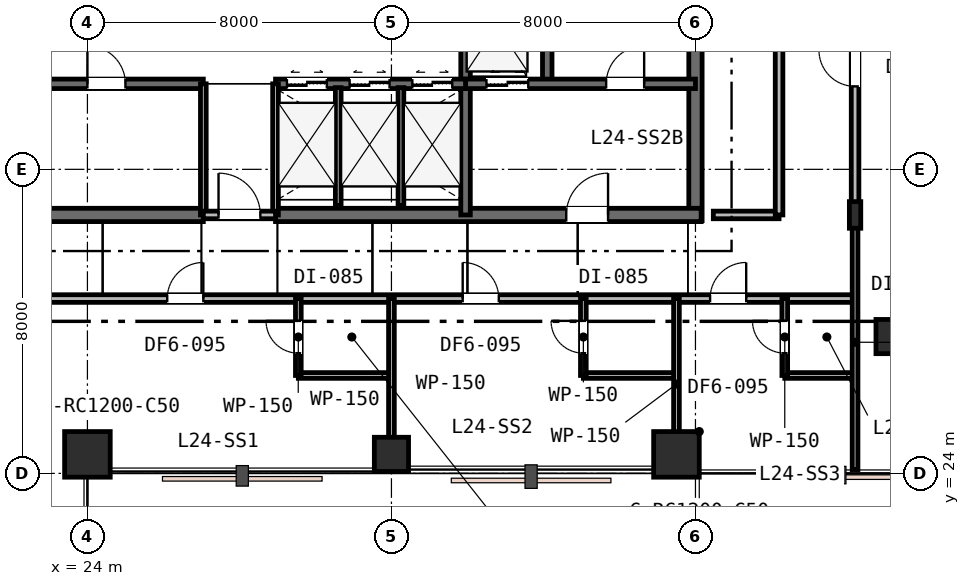
"""IFC4 building model, lengths in metres.
Left out: names, types, materials, properties, quantities, classifications, styles, units other than length and angle.
Written with IfcOpenShell. Run it as: python <this file> out.ifc"""

import sys

from ifc_helpers import new_model, si_unit, direction, frame, frame_2d, origin, origin_2d, place, context, subcontext, project, spatial, rectangle, i_section, extrude, element, fill, save


model = new_model("IFC4")
c1 = context("Model", 3, precision=1e-05, world=origin(), true_north=direction((0.0, 1.0)))
c2 = subcontext(c1, "Body", "Model", "MODEL_VIEW")
j1 = project(units=[si_unit("LENGTHUNIT", "METRE"), si_unit("PLANEANGLEUNIT", "RADIAN")], contexts=[c1])
p1 = place(None, origin())
s1 = spatial("IfcSite", under=j1, at=p1, CompositionType="ELEMENT")
p2 = place(p1, origin())
s2 = spatial("IfcBuilding", under=s1, at=p2, CompositionType="ELEMENT")
p3 = place(p2, frame((0.0, 0.0, 97.2)))
s3 = spatial("IfcBuildingStorey", under=s2, at=p3, CompositionType="ELEMENT", Elevation=97.2)
p4 = place(p3, frame((40.0, 30.65, 0.0), z_axis=(0.0, 0.0, 1.0), x_axis=(0.0, 1.0, 0.0)))
e1 = element("IfcWall", 1, at=p4, inside=s3, PredefinedType="SHEAR", context=c2, shape_type="SweptSolid", body=[
    extrude(rectangle(XDim=12.3, YDim=0.35, at=frame_2d((6.15, 0.0))), origin(), (0.0, 0.0, 1.0), 3.6),
])
p5 = place(p3, frame((15.85, 30.8, 0.0), z_axis=(0.0, 0.0, 1.0), x_axis=(1.0, 0.0, 0.0)))
e2 = element("IfcWall", 2, at=p5, inside=s3, PredefinedType="SHEAR", context=c2, shape_type="SweptSolid", body=[
    extrude(rectangle(XDim=11.2, YDim=0.35, at=frame_2d((5.6, 0.0))), origin(), (0.0, 0.0, 1.0), 3.6),
])
p6 = place(p5, frame((2.45, 0.0, 0.0)))
e3 = element("IfcOpeningElement", 3, at=p6, cuts=e2, PredefinedType="OPENING", context=c2, shape_type="SweptSolid", body=[
    extrude(rectangle(XDim=1.1, YDim=2.15, at=frame_2d((0.55, 1.075))), frame((0.0, 0.185, 0.0), z_axis=(0.0, -1.0, 0.0), x_axis=(1.0, 0.0, 0.0)), (0.0, 0.0, 1.0), 0.37),
])
p7 = place(p3, frame((28.95, 30.8, 0.0), z_axis=(0.0, 0.0, 1.0), x_axis=(1.0, 0.0, 0.0)))
e4 = element("IfcWall", 4, at=p7, inside=s3, PredefinedType="SHEAR", context=c2, shape_type="SweptSolid", body=[
    extrude(rectangle(XDim=11.2, YDim=0.35, at=frame_2d((5.6, 0.0))), origin(), (0.0, 0.0, 1.0), 3.6),
])
p8 = place(p7, frame((7.65, 0.0, 0.0)))
e5 = element("IfcOpeningElement", 5, at=p8, cuts=e4, PredefinedType="OPENING", context=c2, shape_type="SweptSolid", body=[
    extrude(rectangle(XDim=1.1, YDim=2.15, at=frame_2d((0.55, 1.075))), frame((0.0, 0.185, 0.0), z_axis=(0.0, -1.0, 0.0), x_axis=(1.0, 0.0, 0.0)), (0.0, 0.0, 1.0), 0.37),
])
p9 = place(p3, frame((36.1, 34.25, 0.0), z_axis=(0.0, 0.0, 1.0), x_axis=(0.0, 1.0, 0.0)))
e6 = element("IfcWall", 6, at=p9, inside=s3, PredefinedType="SHEAR", context=c2, shape_type="SweptSolid", body=[
    extrude(rectangle(XDim=8.65, YDim=0.25, at=frame_2d((4.325, 0.0))), origin(), (0.0, 0.0, 1.0), 3.6),
])
p10 = place(p3, frame((33.95, 30.8, 0.0), z_axis=(0.0, 0.0, 1.0), x_axis=(0.0, 1.0, 0.0)))
e7 = element("IfcWall", 7, at=p10, inside=s3, PredefinedType="SHEAR", context=c2, shape_type="SweptSolid", body=[
    extrude(rectangle(XDim=6.45, YDim=0.25, at=frame_2d((3.225, 0.0))), origin(), (0.0, 0.0, 1.0), 3.6),
])
p11 = place(p3, frame((33.95, 34.25, 0.0), z_axis=(0.0, 0.0, 1.0), x_axis=(1.0, 0.0, 0.0)))
e8 = element("IfcWall", 8, at=p11, inside=s3, PredefinedType="SHEAR", context=c2, shape_type="SweptSolid", body=[
    extrude(rectangle(XDim=6.05, YDim=0.25, at=frame_2d((3.025, 0.0))), origin(), (0.0, 0.0, 1.0), 3.6),
])
p12 = place(p11, frame((3.7, 0.0, 0.0)))
e9 = element("IfcOpeningElement", 9, at=p12, cuts=e8, PredefinedType="OPENING", context=c2, shape_type="SweptSolid", body=[
    extrude(rectangle(XDim=1.0, YDim=2.15, at=frame_2d((0.5, 1.075))), frame((0.0, 0.135, 0.0), z_axis=(0.0, -1.0, 0.0), x_axis=(1.0, 0.0, 0.0)), (0.0, 0.0, 1.0), 0.27),
])
p13 = place(p11, frame((0.55, 0.0, 0.0)))
e10 = element("IfcOpeningElement", 10, at=p13, cuts=e8, PredefinedType="OPENING", context=c2, shape_type="SweptSolid", body=[
    extrude(rectangle(XDim=1.1, YDim=2.15, at=frame_2d((0.55, 1.075))), frame((0.0, 0.135, 0.0), z_axis=(0.0, -1.0, 0.0), x_axis=(1.0, 0.0, 0.0)), (0.0, 0.0, 1.0), 0.27),
])
p14 = place(p3, frame((22.05, 34.25, 0.0), z_axis=(0.0, 0.0, 1.0), x_axis=(1.0, 0.0, 0.0)))
e11 = element("IfcWall", 11, at=p14, inside=s3, PredefinedType="SHEAR", context=c2, shape_type="SweptSolid", body=[
    extrude(rectangle(XDim=5.0, YDim=0.25, at=frame_2d((2.5, 0.0))), origin(), (0.0, 0.0, 1.0), 3.6),
])
p15 = place(p14, frame((1.95, 0.0, 0.0)))
e12 = element("IfcOpeningElement", 12, at=p15, cuts=e11, PredefinedType="OPENING", context=c2, shape_type="SweptSolid", body=[
    extrude(rectangle(XDim=1.0, YDim=2.15, at=frame_2d((0.5, 1.075))), frame((0.0, 0.135, 0.0), z_axis=(0.0, -1.0, 0.0), x_axis=(1.0, 0.0, 0.0)), (0.0, 0.0, 1.0), 0.27),
])
p16 = place(p3, frame((28.95, 34.25, 0.0), z_axis=(0.0, 0.0, 1.0), x_axis=(1.0, 0.0, 0.0)))
e13 = element("IfcWall", 13, at=p16, inside=s3, PredefinedType="SHEAR", context=c2, shape_type="SweptSolid", body=[
    extrude(rectangle(XDim=5.0, YDim=0.25, at=frame_2d((2.5, 0.0))), origin(), (0.0, 0.0, 1.0), 3.6),
])
p17 = place(p16, frame((0.3, 0.0, 0.0)))
e14 = element("IfcOpeningElement", 14, at=p17, cuts=e13, PredefinedType="OPENING", context=c2, shape_type="SweptSolid", body=[
    extrude(rectangle(XDim=1.05, YDim=2.15, at=frame_2d((0.525, 1.075))), frame((0.0, 0.135, 0.0), z_axis=(0.0, -1.0, 0.0), x_axis=(1.0, 0.0, 0.0)), (0.0, 0.0, 1.0), 0.27),
])
p18 = place(p16, frame((1.95, 0.0, 0.0)))
e15 = element("IfcOpeningElement", 15, at=p18, cuts=e13, PredefinedType="OPENING", context=c2, shape_type="SweptSolid", body=[
    extrude(rectangle(XDim=1.05, YDim=2.15, at=frame_2d((0.525, 1.075))), frame((0.0, 0.135, 0.0), z_axis=(0.0, -1.0, 0.0), x_axis=(1.0, 0.0, 0.0)), (0.0, 0.0, 1.0), 0.27),
])
p19 = place(p16, frame((3.6, 0.0, 0.0)))
e16 = element("IfcOpeningElement", 16, at=p19, cuts=e13, PredefinedType="OPENING", context=c2, shape_type="SweptSolid", body=[
    extrude(rectangle(XDim=1.05, YDim=2.15, at=frame_2d((0.525, 1.075))), frame((0.0, 0.135, 0.0), z_axis=(0.0, -1.0, 0.0), x_axis=(1.0, 0.0, 0.0)), (0.0, 0.0, 1.0), 0.27),
])
p20 = place(p3, frame((24.0, 24.5, 0.0), z_axis=(0.0, 0.0, 1.0), x_axis=(1.0, 0.0, 0.0)))
e17 = element("IfcColumn", 17, at=p20, inside=s3, PredefinedType="COLUMN", context=c2, shape_type="SweptSolid", body=[
    extrude(rectangle(XDim=1.2, YDim=1.2, at=origin_2d()), origin(), (0.0, 0.0, 1.0), 3.6),
])
p21 = place(p3, frame((32.0, 24.5, 0.0), z_axis=(0.0, 0.0, 1.0), x_axis=(1.0, 0.0, 0.0)))
e18 = element("IfcColumn", 18, at=p21, inside=s3, PredefinedType="COLUMN", context=c2, shape_type="SweptSolid", body=[
    extrude(rectangle(XDim=0.9, YDim=0.9, at=origin_2d()), origin(), (0.0, 0.0, 1.0), 3.6),
])
p22 = place(p3, frame((39.5, 24.5, 0.0), z_axis=(0.0, 0.0, 1.0), x_axis=(1.0, 0.0, 0.0)))
e19 = element("IfcColumn", 19, at=p22, inside=s3, PredefinedType="COLUMN", context=c2, shape_type="SweptSolid", body=[
    extrude(rectangle(XDim=1.2, YDim=1.2, at=origin_2d()), origin(), (0.0, 0.0, 1.0), 3.6),
])
p23 = place(p3, frame((45.2, 27.6, 0.0), z_axis=(0.0, 0.0, 1.0), x_axis=(1.0, 0.0, 0.0)))
e20 = element("IfcColumn", 20, at=p23, inside=s3, PredefinedType="COLUMN", context=c2, shape_type="SweptSolid", body=[
    extrude(rectangle(XDim=0.9, YDim=0.9, at=origin_2d()), origin(), (0.0, 0.0, 1.0), 3.6),
])
p24 = place(p3, frame((44.2, 30.8, 0.0), z_axis=(0.0, 0.0, 1.0), x_axis=(1.0, 0.0, 0.0)))
e21 = element("IfcColumn", 21, at=p24, inside=s3, PredefinedType="COLUMN", context=c2, shape_type="SweptSolid", body=[
    extrude(i_section(OverallWidth=0.3, OverallDepth=0.7, WebThickness=0.017, FlangeThickness=0.032, FilletRadius=0.027, at=origin_2d()), origin(), (0.0, 0.0, 1.0), 3.6),
])
p25 = place(p3, frame((27.05, 30.8, 0.0), z_axis=(0.0, 0.0, 1.0), x_axis=(0.0, 1.0, 0.0)))
e22 = element("IfcWall", 22, at=p25, inside=s3, PredefinedType="PLUMBINGWALL", context=c2, shape_type="SweptSolid", body=[
    extrude(rectangle(XDim=3.45, YDim=0.15, at=frame_2d((1.725, 0.0))), origin(), (0.0, 0.0, 1.0), 3.02),
])
p26 = place(p3, frame((28.95, 30.8, 0.0), z_axis=(0.0, 0.0, 1.0), x_axis=(0.0, 1.0, 0.0)))
e23 = element("IfcWall", 23, at=p26, inside=s3, PredefinedType="PLUMBINGWALL", context=c2, shape_type="SweptSolid", body=[
    extrude(rectangle(XDim=3.45, YDim=0.15, at=frame_2d((1.725, 0.0))), origin(), (0.0, 0.0, 1.0), 3.33),
])
p27 = place(p3, frame((27.05, 30.8, 0.0), z_axis=(0.0, 0.0, 1.0), x_axis=(1.0, 0.0, 0.0)))
e24 = element("IfcWall", 24, at=p27, inside=s3, PredefinedType="PARTITIONING", context=c2, shape_type="SweptSolid", body=[
    extrude(rectangle(XDim=1.9, YDim=0.2, at=frame_2d((0.95, 0.0))), origin(), (0.0, 0.0, 1.0), 3.02),
])
p28 = place(p27, frame((0.4, 0.0, 0.0)))
e25 = element("IfcOpeningElement", 25, at=p28, cuts=e24, PredefinedType="OPENING", context=c2, shape_type="SweptSolid", body=[
    extrude(rectangle(XDim=1.1, YDim=2.15, at=frame_2d((0.55, 1.075))), frame((0.0, 0.11, 0.0), z_axis=(0.0, -1.0, 0.0), x_axis=(1.0, 0.0, 0.0)), (0.0, 0.0, 1.0), 0.22),
])
for number, where, z_axis, x_axis in (
    (26, (30.6, 31.05, 0.0), (0.0, 0.0, 1.0), (0.0, 1.0, 0.0)),
    (27, (32.25, 31.05, 0.0), (0.0, 0.0, 1.0), (0.0, 1.0, 0.0)),
):
    element("IfcWall", number, at=place(p3, frame(where, z_axis=z_axis, x_axis=x_axis)), inside=s3, PredefinedType="PLUMBINGWALL", context=c2, shape_type="SweptSolid", body=[
        extrude(rectangle(XDim=3.1, YDim=0.15, at=frame_2d((1.55, 0.0))), origin(), (0.0, 0.0, 1.0), 3.33),
    ])
p29 = place(p3, frame((11.4, 28.6, 0.0), z_axis=(0.0, 0.0, 1.0), x_axis=(1.0, 0.0, 0.0)))
e28 = element("IfcWall", 28, at=p29, inside=s3, PredefinedType="PARTITIONING", context=c2, shape_type="SweptSolid", body=[
    extrude(rectangle(XDim=32.8, YDim=0.2, at=frame_2d((16.4, 0.0))), origin(), (0.0, 0.0, 1.0), 2.83),
])
p30 = place(p29, frame((14.7, 0.0, 0.0)))
e29 = element("IfcOpeningElement", 29, at=p30, cuts=e28, PredefinedType="OPENING", context=c2, shape_type="SweptSolid", body=[
    extrude(rectangle(XDim=0.95, YDim=2.15, at=frame_2d((0.475, 1.075))), frame((0.0, 0.11, 0.0), z_axis=(0.0, -1.0, 0.0), x_axis=(1.0, 0.0, 0.0)), (0.0, 0.0, 1.0), 0.22),
])
p31 = place(p29, frame((22.475, 0.0, 0.0)))
e30 = element("IfcOpeningElement", 30, at=p31, cuts=e28, PredefinedType="OPENING", context=c2, shape_type="SweptSolid", body=[
    extrude(rectangle(XDim=0.95, YDim=2.15, at=frame_2d((0.475, 1.075))), frame((0.0, 0.11, 0.0), z_axis=(0.0, -1.0, 0.0), x_axis=(1.0, 0.0, 0.0)), (0.0, 0.0, 1.0), 0.22),
])
p32 = place(p29, frame((28.985, 0.0, 0.0)))
e31 = element("IfcOpeningElement", 31, at=p32, cuts=e28, PredefinedType="OPENING", context=c2, shape_type="SweptSolid", body=[
    extrude(rectangle(XDim=0.95, YDim=2.15, at=frame_2d((0.475, 1.075))), frame((0.0, 0.11, 0.0), z_axis=(0.0, -1.0, 0.0), x_axis=(1.0, 0.0, 0.0)), (0.0, 0.0, 1.0), 0.22),
])
p33 = place(p3, frame((40.47, 30.8, 0.0), z_axis=(0.0, 0.0, 1.0), x_axis=(1.0, 0.0, 0.0)))
e32 = element("IfcWall", 32, at=p33, inside=s3, PredefinedType="PARTITIONING", context=c2, shape_type="SweptSolid", body=[
    extrude(rectangle(XDim=1.73, YDim=0.2, at=frame_2d((0.865, 0.0))), origin(), (0.0, 0.0, 1.0), 2.83),
])
p34 = place(p3, frame((42.2, 30.8, 0.0), z_axis=(0.0, 0.0, 1.0), x_axis=(0.0, 1.0, 0.0)))
e33 = element("IfcWall", 33, at=p34, inside=s3, PredefinedType="PARTITIONING", context=c2, shape_type="SweptSolid", body=[
    extrude(rectangle(XDim=11.2, YDim=0.2, at=frame_2d((5.6, 0.0))), origin(), (0.0, 0.0, 1.0), 2.83),
])
p35 = place(p3, frame((29.55, 26.576, 0.0), z_axis=(0.0, 0.0, 1.0), x_axis=(1.0, 0.0, 0.0)))
e34 = element("IfcWall", 34, at=p35, inside=s3, PredefinedType="PARTITIONING", context=c2, shape_type="SweptSolid", body=[
    extrude(rectangle(XDim=2.45, YDim=0.15, at=frame_2d((1.225, 0.0))), origin(), (0.0, 0.0, 1.0), 3.33),
])
p36 = place(p3, frame((29.55, 26.576, 0.0), z_axis=(0.0, 0.0, 1.0), x_axis=(0.0, 1.0, 0.0)))
e35 = element("IfcWall", 35, at=p36, inside=s3, PredefinedType="PARTITIONING", context=c2, shape_type="SweptSolid", body=[
    extrude(rectangle(XDim=2.024, YDim=0.15, at=frame_2d((1.012, 0.0))), origin(), (0.0, 0.0, 1.0), 3.33),
])
p37 = place(p36, frame((0.587, 0.0, 0.0)))
e36 = element("IfcOpeningElement", 36, at=p37, cuts=e35, PredefinedType="OPENING", context=c2, shape_type="SweptSolid", body=[
    extrude(rectangle(XDim=0.85, YDim=2.15, at=frame_2d((0.425, 1.075))), frame((0.0, 0.085, 0.0), z_axis=(0.0, -1.0, 0.0), x_axis=(1.0, 0.0, 0.0)), (0.0, 0.0, 1.0), 0.17),
])
p38 = place(p3, frame((32.0, 28.6, 0.0), z_axis=(0.0, 0.0, 1.0), x_axis=(0.0, -1.0, 0.0)))
e37 = element("IfcWall", 37, at=p38, inside=s3, PredefinedType="PARTITIONING", context=c2, shape_type="SweptSolid", body=[
    extrude(rectangle(XDim=4.5, YDim=0.15, at=frame_2d((2.25, 0.0))), origin(), (0.0, 0.0, 1.0), 2.92),
])
p39 = place(p3, frame((37.05, 26.576, 0.0), z_axis=(0.0, 0.0, 1.0), x_axis=(1.0, 0.0, 0.0)))
e38 = element("IfcWall", 38, at=p39, inside=s3, PredefinedType="PARTITIONING", context=c2, shape_type="SweptSolid", body=[
    extrude(rectangle(XDim=2.45, YDim=0.15, at=frame_2d((1.225, 0.0))), origin(), (0.0, 0.0, 1.0), 2.83),
])
p40 = place(p3, frame((37.05, 26.576, 0.0), z_axis=(0.0, 0.0, 1.0), x_axis=(0.0, 1.0, 0.0)))
e39 = element("IfcWall", 39, at=p40, inside=s3, PredefinedType="PARTITIONING", context=c2, shape_type="SweptSolid", body=[
    extrude(rectangle(XDim=2.024, YDim=0.15, at=frame_2d((1.012, 0.0))), origin(), (0.0, 0.0, 1.0), 3.02),
])
p41 = place(p40, frame((0.587, 0.0, 0.0)))
e40 = element("IfcOpeningElement", 40, at=p41, cuts=e39, PredefinedType="OPENING", context=c2, shape_type="SweptSolid", body=[
    extrude(rectangle(XDim=0.85, YDim=2.15, at=frame_2d((0.425, 1.075))), frame((0.0, 0.085, 0.0), z_axis=(0.0, -1.0, 0.0), x_axis=(1.0, 0.0, 0.0)), (0.0, 0.0, 1.0), 0.17),
])
p42 = place(p3, frame((39.5, 28.6, 0.0), z_axis=(0.0, 0.0, 1.0), x_axis=(0.0, -1.0, 0.0)))
e41 = element("IfcWall", 41, at=p42, inside=s3, PredefinedType="PARTITIONING", context=c2, shape_type="SweptSolid", body=[
    extrude(rectangle(XDim=4.5, YDim=0.15, at=frame_2d((2.25, 0.0))), origin(), (0.0, 0.0, 1.0), 2.83),
])
p43 = place(p3, frame((42.35, 26.576, 0.0), z_axis=(0.0, 0.0, 1.0), x_axis=(1.0, 0.0, 0.0)))
e42 = element("IfcWall", 42, at=p43, inside=s3, PredefinedType="PARTITIONING", context=c2, shape_type="SweptSolid", body=[
    extrude(rectangle(XDim=1.85, YDim=0.15, at=frame_2d((0.925, 0.0))), origin(), (0.0, 0.0, 1.0), 3.33),
])
p44 = place(p3, frame((42.35, 26.576, 0.0), z_axis=(0.0, 0.0, 1.0), x_axis=(0.0, 1.0, 0.0)))
e43 = element("IfcWall", 43, at=p44, inside=s3, PredefinedType="PARTITIONING", context=c2, shape_type="SweptSolid", body=[
    extrude(rectangle(XDim=2.024, YDim=0.15, at=frame_2d((1.012, 0.0))), origin(), (0.0, 0.0, 1.0), 3.33),
])
p45 = place(p44, frame((0.587, 0.0, 0.0)))
e44 = element("IfcOpeningElement", 44, at=p45, cuts=e43, PredefinedType="OPENING", context=c2, shape_type="SweptSolid", body=[
    extrude(rectangle(XDim=0.85, YDim=2.15, at=frame_2d((0.425, 1.075))), frame((0.0, 0.085, 0.0), z_axis=(0.0, -1.0, 0.0), x_axis=(1.0, 0.0, 0.0)), (0.0, 0.0, 1.0), 0.17),
])
p46 = place(p3, frame((44.2, 30.8, 0.0), z_axis=(0.0, 0.0, 1.0), x_axis=(0.0, -1.0, 0.0)))
e45 = element("IfcWall", 45, at=p46, inside=s3, PredefinedType="PARTITIONING", context=c2, shape_type="SweptSolid", body=[
    extrude(rectangle(XDim=6.7, YDim=0.15, at=frame_2d((3.35, 0.0))), origin(), (0.0, 0.0, 1.0), 2.83),
])
p47 = place(p3, frame((44.2, 30.8, 0.0), z_axis=(0.0, 0.0, 1.0), x_axis=(0.0, 1.0, 0.0)))
e46 = element("IfcWall", 46, at=p47, inside=s3, PredefinedType="PARTITIONING", context=c2, shape_type="SweptSolid", body=[
    extrude(rectangle(XDim=17.1, YDim=0.2, at=frame_2d((8.55, 0.0))), origin(), (0.0, 0.0, 1.0), 2.83),
])
p48 = place(p47, frame((3.382, 0.0, 0.0)))
e47 = element("IfcOpeningElement", 47, at=p48, cuts=e46, PredefinedType="OPENING", context=c2, shape_type="SweptSolid", body=[
    extrude(rectangle(XDim=0.95, YDim=2.15, at=frame_2d((0.475, 1.075))), frame((0.0, 0.11, 0.0), z_axis=(0.0, -1.0, 0.0), x_axis=(1.0, 0.0, 0.0)), (0.0, 0.0, 1.0), 0.22),
])
p49 = place(p28, origin())
e48 = element("IfcDoor", 48, at=p49, inside=s3, OperationType="SINGLE_SWING_LEFT", PredefinedType="DOOR", context=c2, shape_type="SweptSolid", body=[
    extrude(rectangle(XDim=1.1, YDim=2.15, at=frame_2d((0.55, 1.075))), frame((0.0, 0.025, 0.0), z_axis=(0.0, -1.0, 0.0), x_axis=(1.0, 0.0, 0.0)), (0.0, 0.0, 1.0), 0.05),
])
fill(e25, e48)
p50 = place(p12, origin())
e49 = element("IfcDoor", 49, at=p50, inside=s3, OperationType="SINGLE_SWING_RIGHT", PredefinedType="DOOR", context=c2, shape_type="SweptSolid", body=[
    extrude(rectangle(XDim=1.0, YDim=2.15, at=frame_2d((0.5, 1.075))), frame((0.0, 0.025, 0.0), z_axis=(0.0, -1.0, 0.0), x_axis=(1.0, 0.0, 0.0)), (0.0, 0.0, 1.0), 0.05),
])
fill(e9, e49)
p51 = place(p8, origin())
e50 = element("IfcDoor", 50, at=p51, inside=s3, OperationType="SINGLE_SWING_RIGHT", PredefinedType="DOOR", context=c2, shape_type="SweptSolid", body=[
    extrude(rectangle(XDim=1.1, YDim=2.15, at=frame_2d((0.55, 1.075))), frame((0.0, 0.025, 0.0), z_axis=(0.0, -1.0, 0.0), x_axis=(1.0, 0.0, 0.0)), (0.0, 0.0, 1.0), 0.05),
])
fill(e5, e50)
p52 = place(p15, origin())
e51 = element("IfcDoor", 51, at=p52, inside=s3, OperationType="SINGLE_SWING_LEFT", PredefinedType="DOOR", context=c2, shape_type="SweptSolid", body=[
    extrude(rectangle(XDim=1.0, YDim=2.15, at=frame_2d((0.5, 1.075))), frame((0.0, 0.025, 0.0), z_axis=(0.0, -1.0, 0.0), x_axis=(1.0, 0.0, 0.0)), (0.0, 0.0, 1.0), 0.05),
])
fill(e12, e51)
p53 = place(p30, origin())
e52 = element("IfcDoor", 52, at=p53, inside=s3, OperationType="SINGLE_SWING_RIGHT", PredefinedType="DOOR", context=c2, shape_type="SweptSolid", body=[
    extrude(rectangle(XDim=0.95, YDim=2.15, at=frame_2d((0.475, 1.075))), frame((0.0, 0.025, 0.0), z_axis=(0.0, -1.0, 0.0), x_axis=(1.0, 0.0, 0.0)), (0.0, 0.0, 1.0), 0.05),
])
fill(e29, e52)
p54 = place(p37, origin())
e53 = element("IfcDoor", 53, at=p54, inside=s3, OperationType="SINGLE_SWING_RIGHT", PredefinedType="DOOR", context=c2, shape_type="SweptSolid", body=[
    extrude(rectangle(XDim=0.85, YDim=2.15, at=frame_2d((0.425, 1.075))), frame((0.0, 0.025, 0.0), z_axis=(0.0, -1.0, 0.0), x_axis=(1.0, 0.0, 0.0)), (0.0, 0.0, 1.0), 0.05),
])
fill(e36, e53)
p55 = place(p31, origin())
e54 = element("IfcDoor", 54, at=p55, inside=s3, OperationType="SINGLE_SWING_LEFT", PredefinedType="DOOR", context=c2, shape_type="SweptSolid", body=[
    extrude(rectangle(XDim=0.95, YDim=2.15, at=frame_2d((0.475, 1.075))), frame((0.0, 0.025, 0.0), z_axis=(0.0, -1.0, 0.0), x_axis=(1.0, 0.0, 0.0)), (0.0, 0.0, 1.0), 0.05),
])
fill(e30, e54)
p56 = place(p41, origin())
e55 = element("IfcDoor", 55, at=p56, inside=s3, OperationType="SINGLE_SWING_RIGHT", PredefinedType="DOOR", context=c2, shape_type="SweptSolid", body=[
    extrude(rectangle(XDim=0.85, YDim=2.15, at=frame_2d((0.425, 1.075))), frame((0.0, 0.025, 0.0), z_axis=(0.0, -1.0, 0.0), x_axis=(1.0, 0.0, 0.0)), (0.0, 0.0, 1.0), 0.05),
])
fill(e40, e55)
p57 = place(p32, origin())
e56 = element("IfcDoor", 56, at=p57, inside=s3, OperationType="SINGLE_SWING_RIGHT", PredefinedType="DOOR", context=c2, shape_type="SweptSolid", body=[
    extrude(rectangle(XDim=0.95, YDim=2.15, at=frame_2d((0.475, 1.075))), frame((0.0, 0.025, 0.0), z_axis=(0.0, -1.0, 0.0), x_axis=(1.0, 0.0, 0.0)), (0.0, 0.0, 1.0), 0.05),
])
fill(e31, e56)
p58 = place(p45, origin())
e57 = element("IfcDoor", 57, at=p58, inside=s3, OperationType="SINGLE_SWING_RIGHT", PredefinedType="DOOR", context=c2, shape_type="SweptSolid", body=[
    extrude(rectangle(XDim=0.85, YDim=2.15, at=frame_2d((0.425, 1.075))), frame((0.0, 0.025, 0.0), z_axis=(0.0, -1.0, 0.0), x_axis=(1.0, 0.0, 0.0)), (0.0, 0.0, 1.0), 0.05),
])
fill(e44, e57)
p59 = place(p48, origin())
e58 = element("IfcDoor", 58, at=p59, inside=s3, OperationType="SINGLE_SWING_RIGHT", PredefinedType="DOOR", context=c2, shape_type="SweptSolid", body=[
    extrude(rectangle(XDim=0.95, YDim=2.15, at=frame_2d((0.475, 1.075))), frame((0.0, 0.025, 0.0), z_axis=(0.0, -1.0, 0.0), x_axis=(1.0, 0.0, 0.0)), (0.0, 0.0, 1.0), 0.05),
])
fill(e47, e58)
p60 = place(p13, origin())
e59 = element("IfcDoor", 59, at=p60, inside=s3, OperationType="DOUBLE_DOOR_SLIDING", PredefinedType="DOOR", context=c2, shape_type="SweptSolid", body=[
    extrude(rectangle(XDim=1.1, YDim=2.15, at=frame_2d((0.55, 1.075))), frame((0.0, 0.025, 0.0), z_axis=(0.0, -1.0, 0.0), x_axis=(1.0, 0.0, 0.0)), (0.0, 0.0, 1.0), 0.05),
])
fill(e10, e59)
p61 = place(p17, origin())
e60 = element("IfcDoor", 60, at=p61, inside=s3, OperationType="DOUBLE_DOOR_SLIDING", PredefinedType="DOOR", context=c2, shape_type="SweptSolid", body=[
    extrude(rectangle(XDim=1.05, YDim=2.15, at=frame_2d((0.525, 1.075))), frame((0.0, 0.025, 0.0), z_axis=(0.0, -1.0, 0.0), x_axis=(1.0, 0.0, 0.0)), (0.0, 0.0, 1.0), 0.05),
])
fill(e14, e60)
p62 = place(p18, origin())
e61 = element("IfcDoor", 61, at=p62, inside=s3, OperationType="DOUBLE_DOOR_SLIDING", PredefinedType="DOOR", context=c2, shape_type="SweptSolid", body=[
    extrude(rectangle(XDim=1.05, YDim=2.15, at=frame_2d((0.525, 1.075))), frame((0.0, 0.025, 0.0), z_axis=(0.0, -1.0, 0.0), x_axis=(1.0, 0.0, 0.0)), (0.0, 0.0, 1.0), 0.05),
])
fill(e15, e61)
p63 = place(p19, origin())
e62 = element("IfcDoor", 62, at=p63, inside=s3, OperationType="DOUBLE_DOOR_SLIDING", PredefinedType="DOOR", context=c2, shape_type="SweptSolid", body=[
    extrude(rectangle(XDim=1.05, YDim=2.15, at=frame_2d((0.525, 1.075))), frame((0.0, 0.025, 0.0), z_axis=(0.0, -1.0, 0.0), x_axis=(1.0, 0.0, 0.0)), (0.0, 0.0, 1.0), 0.05),
])
fill(e16, e62)
save(model, sys.argv[1])
